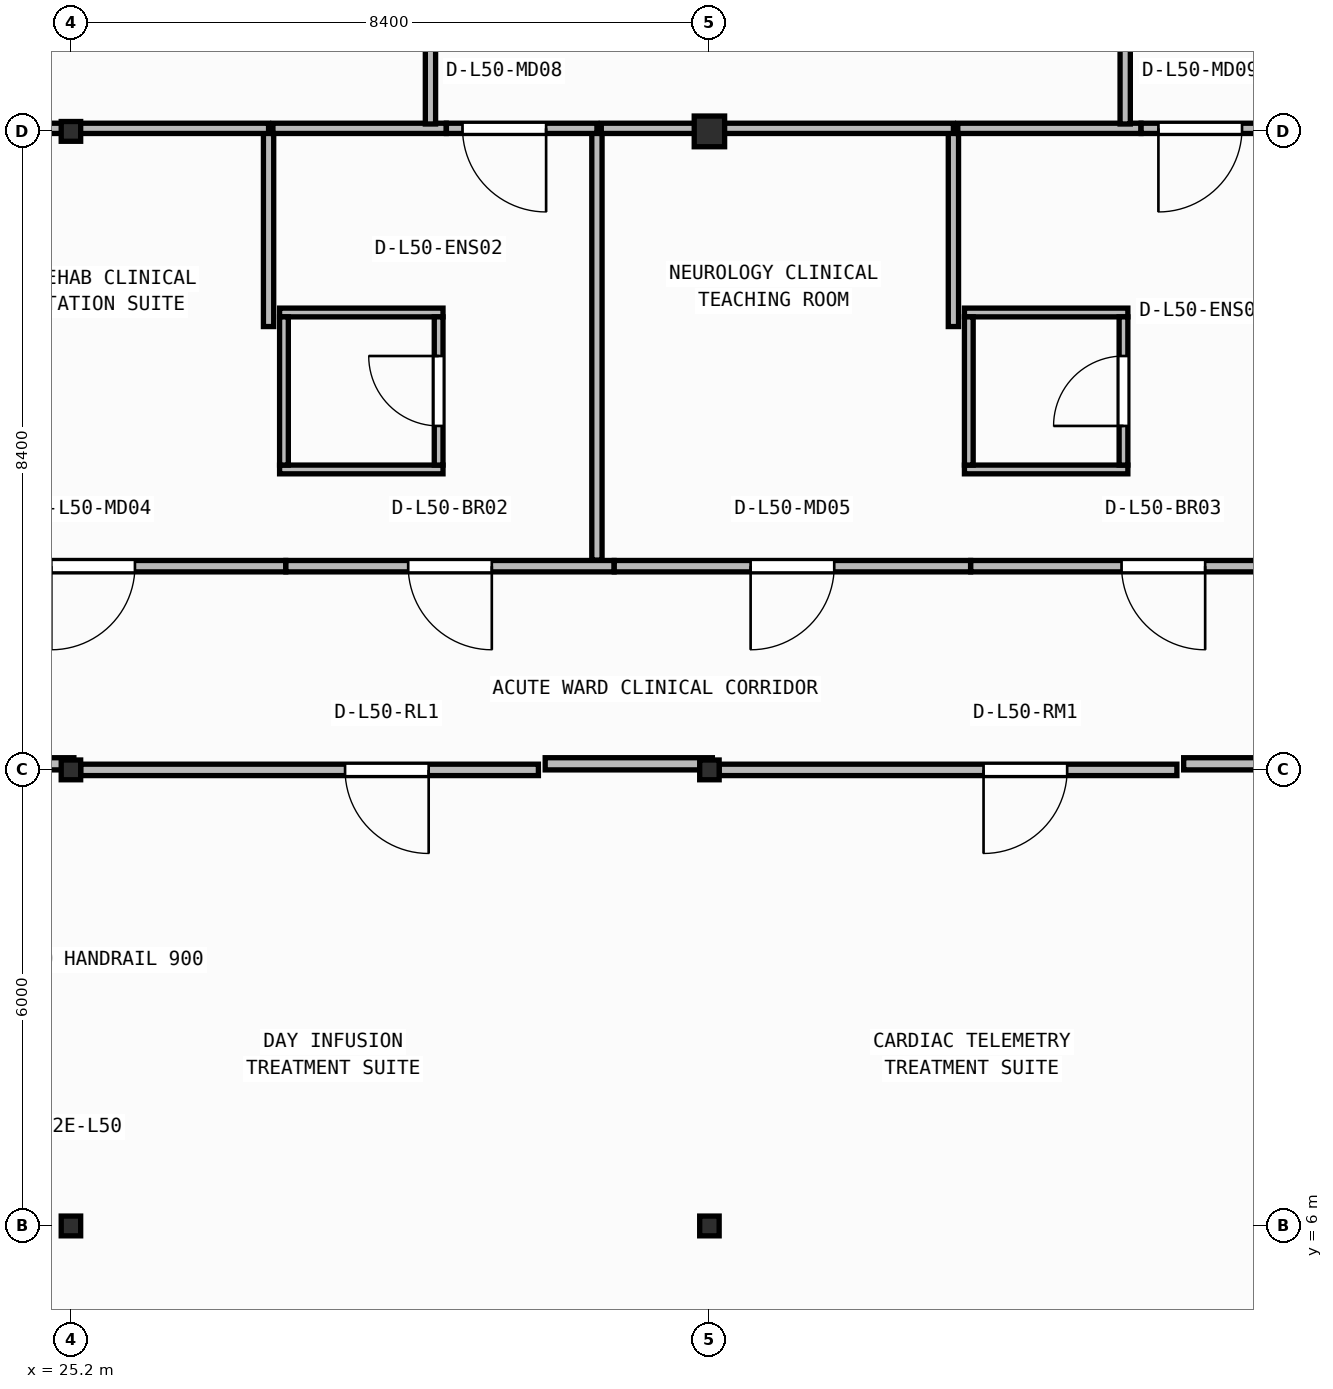
"""IFC4 building model, lengths in metres.
Left out: names, types, materials, properties, quantities, classifications, styles, units other than length and angle.
Written with IfcOpenShell. Run it as: python <this file> out.ifc"""

import sys

from ifc_helpers import new_model, si_unit, direction, frame, frame_2d, origin, origin_2d, place, context, subcontext, project, spatial, rectangle, i_section, extrude, element, fill, save


model = new_model("IFC4")
c1 = context("Model", 3, precision=1e-05, world=origin(), true_north=direction((0.0, 1.0)))
c2 = subcontext(c1, "Body", "Model", "MODEL_VIEW")
j1 = project(units=[si_unit("LENGTHUNIT", "METRE"), si_unit("PLANEANGLEUNIT", "RADIAN")], contexts=[c1])
p1 = place(None, origin())
s1 = spatial("IfcSite", under=j1, at=p1, CompositionType="ELEMENT")
p2 = place(p1, origin())
s2 = spatial("IfcBuilding", under=s1, at=p2, CompositionType="ELEMENT")
p3 = place(p2, frame((0.0, 0.0, 203.95)))
s3 = spatial("IfcBuildingStorey", under=s2, at=p3, CompositionType="ELEMENT", Elevation=203.95)
for number, where, z_axis, x_axis in (
    (1, (25.2, 6.0, 0.0), (0.0, 0.0, 1.0), (1.0, 0.0, 0.0)),
    (2, (33.6, 6.0, 0.0), (0.0, 0.0, 1.0), (1.0, 0.0, 0.0)),
    (3, (25.2, 12.0, 0.0), (0.0, 0.0, 1.0), (1.0, 0.0, 0.0)),
    (4, (33.6, 12.0, 0.0), (0.0, 0.0, 1.0), (1.0, 0.0, 0.0)),
    (5, (25.2, 20.4, 0.0), (0.0, 0.0, 1.0), (1.0, 0.0, 0.0)),
):
    element("IfcColumn", number, at=place(p3, frame(where, z_axis=z_axis, x_axis=x_axis)), inside=s3, PredefinedType="COLUMN", context=c2, shape_type="SweptSolid", body=[
        extrude(i_section(OverallWidth=0.256, OverallDepth=0.26, WebThickness=0.01, FlangeThickness=0.017, FilletRadius=0.013, at=origin_2d()), origin(), (0.0, 0.0, 1.0), 3.95),
    ])
p4 = place(p3, frame((33.6, 20.4, 0.0), z_axis=(0.0, 0.0, 1.0), x_axis=(1.0, 0.0, 0.0)))
e6 = element("IfcColumn", 6, at=p4, inside=s3, PredefinedType="COLUMN", context=c2, shape_type="SweptSolid", body=[
    extrude(i_section(OverallWidth=0.4, OverallDepth=0.404, WebThickness=0.02, FlangeThickness=0.032, at=origin_2d()), origin(), (0.0, 0.0, 1.0), 3.95),
])
p5 = place(p3, frame((27.945, 15.952, 0.0), z_axis=(0.0, 0.0, 1.0), x_axis=(1.0, 0.0, 0.0)))
e7 = element("IfcWall", 7, at=p5, inside=s3, PredefinedType="PARTITIONING", context=c2, shape_type="SweptSolid", body=[
    extrude(rectangle(XDim=2.15, YDim=0.115, at=frame_2d((1.075, 0.0))), origin(), (0.0, 0.0, 1.0), 3.381),
])
p6 = place(p3, frame((27.945, 18.018, 0.0), z_axis=(0.0, 0.0, 1.0), x_axis=(1.0, 0.0, 0.0)))
e8 = element("IfcWall", 8, at=p6, inside=s3, PredefinedType="PARTITIONING", context=c2, shape_type="SweptSolid", body=[
    extrude(rectangle(XDim=2.15, YDim=0.115, at=frame_2d((1.075, 0.0))), origin(), (0.0, 0.0, 1.0), 3.71),
])
p7 = place(p3, frame((28.002, 16.01, 0.0), z_axis=(0.0, 0.0, 1.0), x_axis=(0.0, 1.0, 0.0)))
e9 = element("IfcWall", 9, at=p7, inside=s3, PredefinedType="PARTITIONING", context=c2, shape_type="SweptSolid", body=[
    extrude(rectangle(XDim=1.95, YDim=0.115, at=frame_2d((0.975, 0.0))), origin(), (0.0, 0.0, 1.0), 3.71),
])
p8 = place(p3, frame((30.038, 16.01, 0.0), z_axis=(0.0, 0.0, 1.0), x_axis=(0.0, 1.0, 0.0)))
e10 = element("IfcWall", 10, at=p8, inside=s3, PredefinedType="PARTITIONING", context=c2, shape_type="SweptSolid", body=[
    extrude(rectangle(XDim=1.95, YDim=0.115, at=frame_2d((0.975, 0.0))), origin(), (0.0, 0.0, 1.0), 3.71),
])
p9 = place(p8, frame((0.515, 0.0, 0.0)))
e11 = element("IfcOpeningElement", 11, at=p9, cuts=e10, PredefinedType="OPENING", context=c2, shape_type="SweptSolid", body=[
    extrude(rectangle(XDim=0.92, YDim=2.1, at=frame_2d((0.46, 1.05))), frame((0.0, 0.067, 0.0), z_axis=(0.0, -1.0, 0.0), x_axis=(1.0, 0.0, 0.0)), (0.0, 0.0, 1.0), 0.135),
])
p10 = place(p3, frame((36.955, 15.952, 0.0), z_axis=(0.0, 0.0, 1.0), x_axis=(1.0, 0.0, 0.0)))
e12 = element("IfcWall", 12, at=p10, inside=s3, PredefinedType="PARTITIONING", context=c2, shape_type="SweptSolid", body=[
    extrude(rectangle(XDim=2.15, YDim=0.115, at=frame_2d((1.075, 0.0))), origin(), (0.0, 0.0, 1.0), 3.381),
])
p11 = place(p3, frame((36.955, 18.018, 0.0), z_axis=(0.0, 0.0, 1.0), x_axis=(1.0, 0.0, 0.0)))
e13 = element("IfcWall", 13, at=p11, inside=s3, PredefinedType="PARTITIONING", context=c2, shape_type="SweptSolid", body=[
    extrude(rectangle(XDim=2.15, YDim=0.115, at=frame_2d((1.075, 0.0))), origin(), (0.0, 0.0, 1.0), 3.71),
])
p12 = place(p3, frame((37.012, 16.01, 0.0), z_axis=(0.0, 0.0, 1.0), x_axis=(0.0, 1.0, 0.0)))
e14 = element("IfcWall", 14, at=p12, inside=s3, PredefinedType="PARTITIONING", context=c2, shape_type="SweptSolid", body=[
    extrude(rectangle(XDim=1.95, YDim=0.115, at=frame_2d((0.975, 0.0))), origin(), (0.0, 0.0, 1.0), 3.71),
])
p13 = place(p3, frame((39.048, 16.01, 0.0), z_axis=(0.0, 0.0, 1.0), x_axis=(0.0, 1.0, 0.0)))
e15 = element("IfcWall", 15, at=p13, inside=s3, PredefinedType="PARTITIONING", context=c2, shape_type="SweptSolid", body=[
    extrude(rectangle(XDim=1.95, YDim=0.115, at=frame_2d((0.975, 0.0))), origin(), (0.0, 0.0, 1.0), 3.71),
])
p14 = place(p13, frame((0.515, 0.0, 0.0)))
e16 = element("IfcOpeningElement", 16, at=p14, cuts=e15, PredefinedType="OPENING", context=c2, shape_type="SweptSolid", body=[
    extrude(rectangle(XDim=0.92, YDim=2.1, at=frame_2d((0.46, 1.05))), frame((0.0, 0.067, 0.0), z_axis=(0.0, -1.0, 0.0), x_axis=(1.0, 0.0, 0.0)), (0.0, 0.0, 1.0), 0.135),
])
p15 = place(p3, frame((31.35, 12.0, 0.0), z_axis=(0.0, 0.0, 1.0), x_axis=(-1.0, 0.0, 0.0)))
e17 = element("IfcWall", 17, at=p15, inside=s3, PredefinedType="PARTITIONING", context=c2, shape_type="SweptSolid", body=[
    extrude(rectangle(XDim=6.022, YDim=0.15, at=frame_2d((3.011, 0.0))), origin(), (0.0, 0.0, 1.0), 3.152),
])
p16 = place(p15, frame((1.444, 0.0, 0.0)))
e18 = element("IfcOpeningElement", 18, at=p16, cuts=e17, PredefinedType="OPENING", context=c2, shape_type="SweptSolid", body=[
    extrude(rectangle(XDim=1.1, YDim=2.1, at=frame_2d((0.55, 1.05))), frame((0.0, 0.085, 0.0), z_axis=(0.0, -1.0, 0.0), x_axis=(1.0, 0.0, 0.0)), (0.0, 0.0, 1.0), 0.17),
])
p17 = place(p3, frame((39.75, 12.0, 0.0), z_axis=(0.0, 0.0, 1.0), x_axis=(-1.0, 0.0, 0.0)))
e19 = element("IfcWall", 19, at=p17, inside=s3, PredefinedType="PARTITIONING", context=c2, shape_type="SweptSolid", body=[
    extrude(rectangle(XDim=6.022, YDim=0.15, at=frame_2d((3.011, 0.0))), origin(), (0.0, 0.0, 1.0), 3.152),
])
p18 = place(p17, frame((1.444, 0.0, 0.0)))
e20 = element("IfcOpeningElement", 20, at=p18, cuts=e19, PredefinedType="OPENING", context=c2, shape_type="SweptSolid", body=[
    extrude(rectangle(XDim=1.1, YDim=2.1, at=frame_2d((0.55, 1.05))), frame((0.0, 0.085, 0.0), z_axis=(0.0, -1.0, 0.0), x_axis=(1.0, 0.0, 0.0)), (0.0, 0.0, 1.0), 0.17),
])
p19 = place(p3, frame((28.026, 14.68, 0.0), z_axis=(0.0, 0.0, 1.0), x_axis=(-1.0, 0.0, 0.0)))
e21 = element("IfcWall", 21, at=p19, inside=s3, PredefinedType="PARTITIONING", context=c2, shape_type="SweptSolid", body=[
    extrude(rectangle(XDim=5.068, YDim=0.15, at=frame_2d((2.534, 0.0))), origin(), (0.0, 0.0, 1.0), 3.71),
])
p20 = place(p19, frame((1.984, 0.0, 0.0)))
e22 = element("IfcOpeningElement", 22, at=p20, cuts=e21, PredefinedType="OPENING", context=c2, shape_type="SweptSolid", body=[
    extrude(rectangle(XDim=1.1, YDim=2.1, at=frame_2d((0.55, 1.05))), frame((0.0, 0.085, 0.0), z_axis=(0.0, -1.0, 0.0), x_axis=(1.0, 0.0, 0.0)), (0.0, 0.0, 1.0), 0.17),
])
p21 = place(p3, frame((32.346, 14.68, 0.0), z_axis=(0.0, 0.0, 1.0), x_axis=(-1.0, 0.0, 0.0)))
e23 = element("IfcWall", 23, at=p21, inside=s3, PredefinedType="PARTITIONING", context=c2, shape_type="SweptSolid", body=[
    extrude(rectangle(XDim=4.318, YDim=0.15, at=frame_2d((2.159, 0.0))), origin(), (0.0, 0.0, 1.0), 3.71),
])
p22 = place(p21, frame((1.609, 0.0, 0.0)))
e24 = element("IfcOpeningElement", 24, at=p22, cuts=e23, PredefinedType="OPENING", context=c2, shape_type="SweptSolid", body=[
    extrude(rectangle(XDim=1.1, YDim=2.1, at=frame_2d((0.55, 1.05))), frame((0.0, 0.085, 0.0), z_axis=(0.0, -1.0, 0.0), x_axis=(1.0, 0.0, 0.0)), (0.0, 0.0, 1.0), 0.17),
])
p23 = place(p3, frame((37.036, 14.68, 0.0), z_axis=(0.0, 0.0, 1.0), x_axis=(-1.0, 0.0, 0.0)))
e25 = element("IfcWall", 25, at=p23, inside=s3, PredefinedType="PARTITIONING", context=c2, shape_type="SweptSolid", body=[
    extrude(rectangle(XDim=4.688, YDim=0.15, at=frame_2d((2.344, 0.0))), origin(), (0.0, 0.0, 1.0), 3.71),
])
p24 = place(p23, frame((1.794, 0.0, 0.0)))
e26 = element("IfcOpeningElement", 26, at=p24, cuts=e25, PredefinedType="OPENING", context=c2, shape_type="SweptSolid", body=[
    extrude(rectangle(XDim=1.1, YDim=2.1, at=frame_2d((0.55, 1.05))), frame((0.0, 0.085, 0.0), z_axis=(0.0, -1.0, 0.0), x_axis=(1.0, 0.0, 0.0)), (0.0, 0.0, 1.0), 0.17),
])
p25 = place(p3, frame((42.106, 14.68, 0.0), z_axis=(0.0, 0.0, 1.0), x_axis=(-1.0, 0.0, 0.0)))
e27 = element("IfcWall", 27, at=p25, inside=s3, PredefinedType="PARTITIONING", context=c2, shape_type="SweptSolid", body=[
    extrude(rectangle(XDim=5.068, YDim=0.15, at=frame_2d((2.534, 0.0))), origin(), (0.0, 0.0, 1.0), 3.71),
])
p26 = place(p25, frame((1.984, 0.0, 0.0)))
e28 = element("IfcOpeningElement", 28, at=p26, cuts=e27, PredefinedType="OPENING", context=c2, shape_type="SweptSolid", body=[
    extrude(rectangle(XDim=1.1, YDim=2.1, at=frame_2d((0.55, 1.05))), frame((0.0, 0.085, 0.0), z_axis=(0.0, -1.0, 0.0), x_axis=(1.0, 0.0, 0.0)), (0.0, 0.0, 1.0), 0.17),
])
p27 = place(p3, frame((27.8, 17.833, 0.0), z_axis=(0.0, 0.0, 1.0), x_axis=(0.0, 1.0, 0.0)))
e29 = element("IfcWall", 29, at=p27, inside=s3, PredefinedType="PARTITIONING", context=c2, shape_type="SweptSolid", body=[
    extrude(rectangle(XDim=2.607, YDim=0.135, at=frame_2d((1.304, 0.0))), origin(), (0.0, 0.0, 1.0), 3.71),
])
p28 = place(p3, frame((27.8, 20.44, 0.0), z_axis=(0.0, 0.0, 1.0), x_axis=(-1.0, 0.0, 0.0)))
e30 = element("IfcWall", 30, at=p28, inside=s3, PredefinedType="PARTITIONING", context=c2, shape_type="SweptSolid", body=[
    extrude(rectangle(XDim=5.012, YDim=0.135, at=frame_2d((2.506, 0.0))), origin(), (0.0, 0.0, 1.0), 3.152),
])
p29 = place(p3, frame((32.12, 14.76, 0.0), z_axis=(0.0, 0.0, 1.0), x_axis=(0.0, 1.0, 0.0)))
e31 = element("IfcWall", 31, at=p29, inside=s3, PredefinedType="PARTITIONING", context=c2, shape_type="SweptSolid", body=[
    extrude(rectangle(XDim=5.68, YDim=0.135, at=frame_2d((2.84, 0.0))), origin(), (0.0, 0.0, 1.0), 3.71),
])
p30 = place(p3, frame((30.137, 20.44, 0.0), z_axis=(0.0, 0.0, 1.0), x_axis=(-1.0, 0.0, 0.0)))
e32 = element("IfcWall", 32, at=p30, inside=s3, PredefinedType="PARTITIONING", context=c2, shape_type="SweptSolid", body=[
    extrude(rectangle(XDim=2.28, YDim=0.135, at=frame_2d((1.14, 0.0))), origin(), (0.0, 0.0, 1.0), 3.152),
])
p31 = place(p3, frame((32.12, 20.44, 0.0), z_axis=(0.0, 0.0, 1.0), x_axis=(-1.0, 0.0, 0.0)))
e33 = element("IfcWall", 33, at=p31, inside=s3, PredefinedType="PARTITIONING", context=c2, shape_type="SweptSolid", body=[
    extrude(rectangle(XDim=1.981, YDim=0.135, at=frame_2d((0.99, 0.0))), origin(), (0.0, 0.0, 1.0), 3.152),
])
p32 = place(p31, frame((0.668, 0.0, 0.0)))
e34 = element("IfcOpeningElement", 34, at=p32, cuts=e33, PredefinedType="OPENING", context=c2, shape_type="SweptSolid", body=[
    extrude(rectangle(XDim=1.1, YDim=2.1, at=frame_2d((0.55, 1.05))), frame((0.0, 0.077, 0.0), z_axis=(0.0, -1.0, 0.0), x_axis=(1.0, 0.0, 0.0)), (0.0, 0.0, 1.0), 0.155),
])
p33 = place(p3, frame((36.81, 17.833, 0.0), z_axis=(0.0, 0.0, 1.0), x_axis=(0.0, 1.0, 0.0)))
e35 = element("IfcWall", 35, at=p33, inside=s3, PredefinedType="PARTITIONING", context=c2, shape_type="SweptSolid", body=[
    extrude(rectangle(XDim=2.607, YDim=0.135, at=frame_2d((1.304, 0.0))), origin(), (0.0, 0.0, 1.0), 3.71),
])
p34 = place(p3, frame((36.81, 20.44, 0.0), z_axis=(0.0, 0.0, 1.0), x_axis=(-1.0, 0.0, 0.0)))
e36 = element("IfcWall", 36, at=p34, inside=s3, PredefinedType="PARTITIONING", context=c2, shape_type="SweptSolid", body=[
    extrude(rectangle(XDim=4.633, YDim=0.135, at=frame_2d((2.316, 0.0))), origin(), (0.0, 0.0, 1.0), 3.152),
])
p35 = place(p3, frame((39.278, 20.44, 0.0), z_axis=(0.0, 0.0, 1.0), x_axis=(-1.0, 0.0, 0.0)))
e37 = element("IfcWall", 37, at=p35, inside=s3, PredefinedType="PARTITIONING", context=c2, shape_type="SweptSolid", body=[
    extrude(rectangle(XDim=2.41, YDim=0.135, at=frame_2d((1.205, 0.0))), origin(), (0.0, 0.0, 1.0), 3.152),
])
p36 = place(p3, frame((41.88, 20.44, 0.0), z_axis=(0.0, 0.0, 1.0), x_axis=(-1.0, 0.0, 0.0)))
e38 = element("IfcWall", 38, at=p36, inside=s3, PredefinedType="PARTITIONING", context=c2, shape_type="SweptSolid", body=[
    extrude(rectangle(XDim=2.6, YDim=0.135, at=frame_2d((1.3, 0.0))), origin(), (0.0, 0.0, 1.0), 3.152),
])
p37 = place(p36, frame((1.273, 0.0, 0.0)))
e39 = element("IfcOpeningElement", 39, at=p37, cuts=e38, PredefinedType="OPENING", context=c2, shape_type="SweptSolid", body=[
    extrude(rectangle(XDim=1.1, YDim=2.1, at=frame_2d((0.55, 1.05))), frame((0.0, 0.077, 0.0), z_axis=(0.0, -1.0, 0.0), x_axis=(1.0, 0.0, 0.0)), (0.0, 0.0, 1.0), 0.155),
])
for number, where, z_axis, x_axis in (
    (40, (29.93, 20.498, 0.0), (0.0, 0.0, 1.0), (0.0, 1.0, 0.0)),
    (41, (39.07, 20.498, 0.0), (0.0, 0.0, 1.0), (0.0, 1.0, 0.0)),
):
    element("IfcWall", number, at=place(p3, frame(where, z_axis=z_axis, x_axis=x_axis)), inside=s3, PredefinedType="PARTITIONING", context=c2, shape_type="SweptSolid", body=[
        extrude(rectangle(XDim=6.642, YDim=0.135, at=frame_2d((3.321, 0.0))), origin(), (0.0, 0.0, 1.0), 3.71),
    ])
p38 = place(p3, frame((24.02, 12.08, 0.0), z_axis=(0.0, 0.0, 1.0), x_axis=(1.0, 0.0, 0.0)))
e42 = element("IfcWall", 42, at=p38, inside=s3, PredefinedType="PARTITIONING", context=c2, shape_type="SweptSolid", body=[
    extrude(rectangle(XDim=1.219, YDim=0.16, at=frame_2d((0.609, 0.0))), origin(), (0.0, 0.0, 1.0), 3.152),
])
p39 = place(p3, frame((31.439, 12.08, 0.0), z_axis=(0.0, 0.0, 1.0), x_axis=(1.0, 0.0, 0.0)))
e43 = element("IfcWall", 43, at=p39, inside=s3, PredefinedType="PARTITIONING", context=c2, shape_type="SweptSolid", body=[
    extrude(rectangle(XDim=2.199, YDim=0.16, at=frame_2d((1.1, 0.0))), origin(), (0.0, 0.0, 1.0), 3.152),
])
p40 = place(p3, frame((39.839, 12.08, 0.0), z_axis=(0.0, 0.0, 1.0), x_axis=(1.0, 0.0, 0.0)))
e44 = element("IfcWall", 44, at=p40, inside=s3, PredefinedType="PARTITIONING", context=c2, shape_type="SweptSolid", body=[
    extrude(rectangle(XDim=1.871, YDim=0.16, at=frame_2d((0.936, 0.0))), origin(), (0.0, 0.0, 1.0), 3.152),
])
p41 = place(p9, origin())
e45 = element("IfcDoor", 45, at=p41, inside=s3, OperationType="SINGLE_SWING_RIGHT", PredefinedType="DOOR", context=c2, shape_type="SweptSolid", body=[
    extrude(rectangle(XDim=0.92, YDim=2.1, at=frame_2d((0.46, 1.05))), frame((0.0, 0.025, 0.0), z_axis=(0.0, -1.0, 0.0), x_axis=(1.0, 0.0, 0.0)), (0.0, 0.0, 1.0), 0.05),
])
fill(e11, e45)
p42 = place(p14, origin())
e46 = element("IfcDoor", 46, at=p42, inside=s3, OperationType="SINGLE_SWING_LEFT", PredefinedType="DOOR", context=c2, shape_type="SweptSolid", body=[
    extrude(rectangle(XDim=0.92, YDim=2.1, at=frame_2d((0.46, 1.05))), frame((0.0, 0.025, 0.0), z_axis=(0.0, -1.0, 0.0), x_axis=(1.0, 0.0, 0.0)), (0.0, 0.0, 1.0), 0.05),
])
fill(e16, e46)
p43 = place(p16, origin())
e47 = element("IfcDoor", 47, at=p43, inside=s3, OperationType="SINGLE_SWING_LEFT", PredefinedType="DOOR", context=c2, shape_type="SweptSolid", body=[
    extrude(rectangle(XDim=1.1, YDim=2.1, at=frame_2d((0.55, 1.05))), frame((0.0, 0.025, 0.0), z_axis=(0.0, -1.0, 0.0), x_axis=(1.0, 0.0, 0.0)), (0.0, 0.0, 1.0), 0.05),
])
fill(e18, e47)
p44 = place(p18, origin())
e48 = element("IfcDoor", 48, at=p44, inside=s3, OperationType="SINGLE_SWING_RIGHT", PredefinedType="DOOR", context=c2, shape_type="SweptSolid", body=[
    extrude(rectangle(XDim=1.1, YDim=2.1, at=frame_2d((0.55, 1.05))), frame((0.0, 0.025, 0.0), z_axis=(0.0, -1.0, 0.0), x_axis=(1.0, 0.0, 0.0)), (0.0, 0.0, 1.0), 0.05),
])
fill(e20, e48)
p45 = place(p20, origin())
e49 = element("IfcDoor", 49, at=p45, inside=s3, OperationType="SINGLE_SWING_RIGHT", PredefinedType="DOOR", context=c2, shape_type="SweptSolid", body=[
    extrude(rectangle(XDim=1.1, YDim=2.1, at=frame_2d((0.55, 1.05))), frame((0.0, 0.025, 0.0), z_axis=(0.0, -1.0, 0.0), x_axis=(1.0, 0.0, 0.0)), (0.0, 0.0, 1.0), 0.05),
])
fill(e22, e49)
p46 = place(p22, origin())
e50 = element("IfcDoor", 50, at=p46, inside=s3, OperationType="SINGLE_SWING_LEFT", PredefinedType="DOOR", context=c2, shape_type="SweptSolid", body=[
    extrude(rectangle(XDim=1.1, YDim=2.1, at=frame_2d((0.55, 1.05))), frame((0.0, 0.025, 0.0), z_axis=(0.0, -1.0, 0.0), x_axis=(1.0, 0.0, 0.0)), (0.0, 0.0, 1.0), 0.05),
])
fill(e24, e50)
p47 = place(p24, origin())
e51 = element("IfcDoor", 51, at=p47, inside=s3, OperationType="SINGLE_SWING_RIGHT", PredefinedType="DOOR", context=c2, shape_type="SweptSolid", body=[
    extrude(rectangle(XDim=1.1, YDim=2.1, at=frame_2d((0.55, 1.05))), frame((0.0, 0.025, 0.0), z_axis=(0.0, -1.0, 0.0), x_axis=(1.0, 0.0, 0.0)), (0.0, 0.0, 1.0), 0.05),
])
fill(e26, e51)
p48 = place(p26, origin())
e52 = element("IfcDoor", 52, at=p48, inside=s3, OperationType="SINGLE_SWING_LEFT", PredefinedType="DOOR", context=c2, shape_type="SweptSolid", body=[
    extrude(rectangle(XDim=1.1, YDim=2.1, at=frame_2d((0.55, 1.05))), frame((0.0, 0.025, 0.0), z_axis=(0.0, -1.0, 0.0), x_axis=(1.0, 0.0, 0.0)), (0.0, 0.0, 1.0), 0.05),
])
fill(e28, e52)
p49 = place(p32, origin())
e53 = element("IfcDoor", 53, at=p49, inside=s3, OperationType="SINGLE_SWING_LEFT", PredefinedType="DOOR", context=c2, shape_type="SweptSolid", body=[
    extrude(rectangle(XDim=1.1, YDim=2.1, at=frame_2d((0.55, 1.05))), frame((0.0, 0.025, 0.0), z_axis=(0.0, -1.0, 0.0), x_axis=(1.0, 0.0, 0.0)), (0.0, 0.0, 1.0), 0.05),
])
fill(e34, e53)
p50 = place(p37, origin())
e54 = element("IfcDoor", 54, at=p50, inside=s3, OperationType="SINGLE_SWING_RIGHT", PredefinedType="DOOR", context=c2, shape_type="SweptSolid", body=[
    extrude(rectangle(XDim=1.1, YDim=2.1, at=frame_2d((0.55, 1.05))), frame((0.0, 0.025, 0.0), z_axis=(0.0, -1.0, 0.0), x_axis=(1.0, 0.0, 0.0)), (0.0, 0.0, 1.0), 0.05),
])
fill(e39, e54)
save(model, sys.argv[1])
